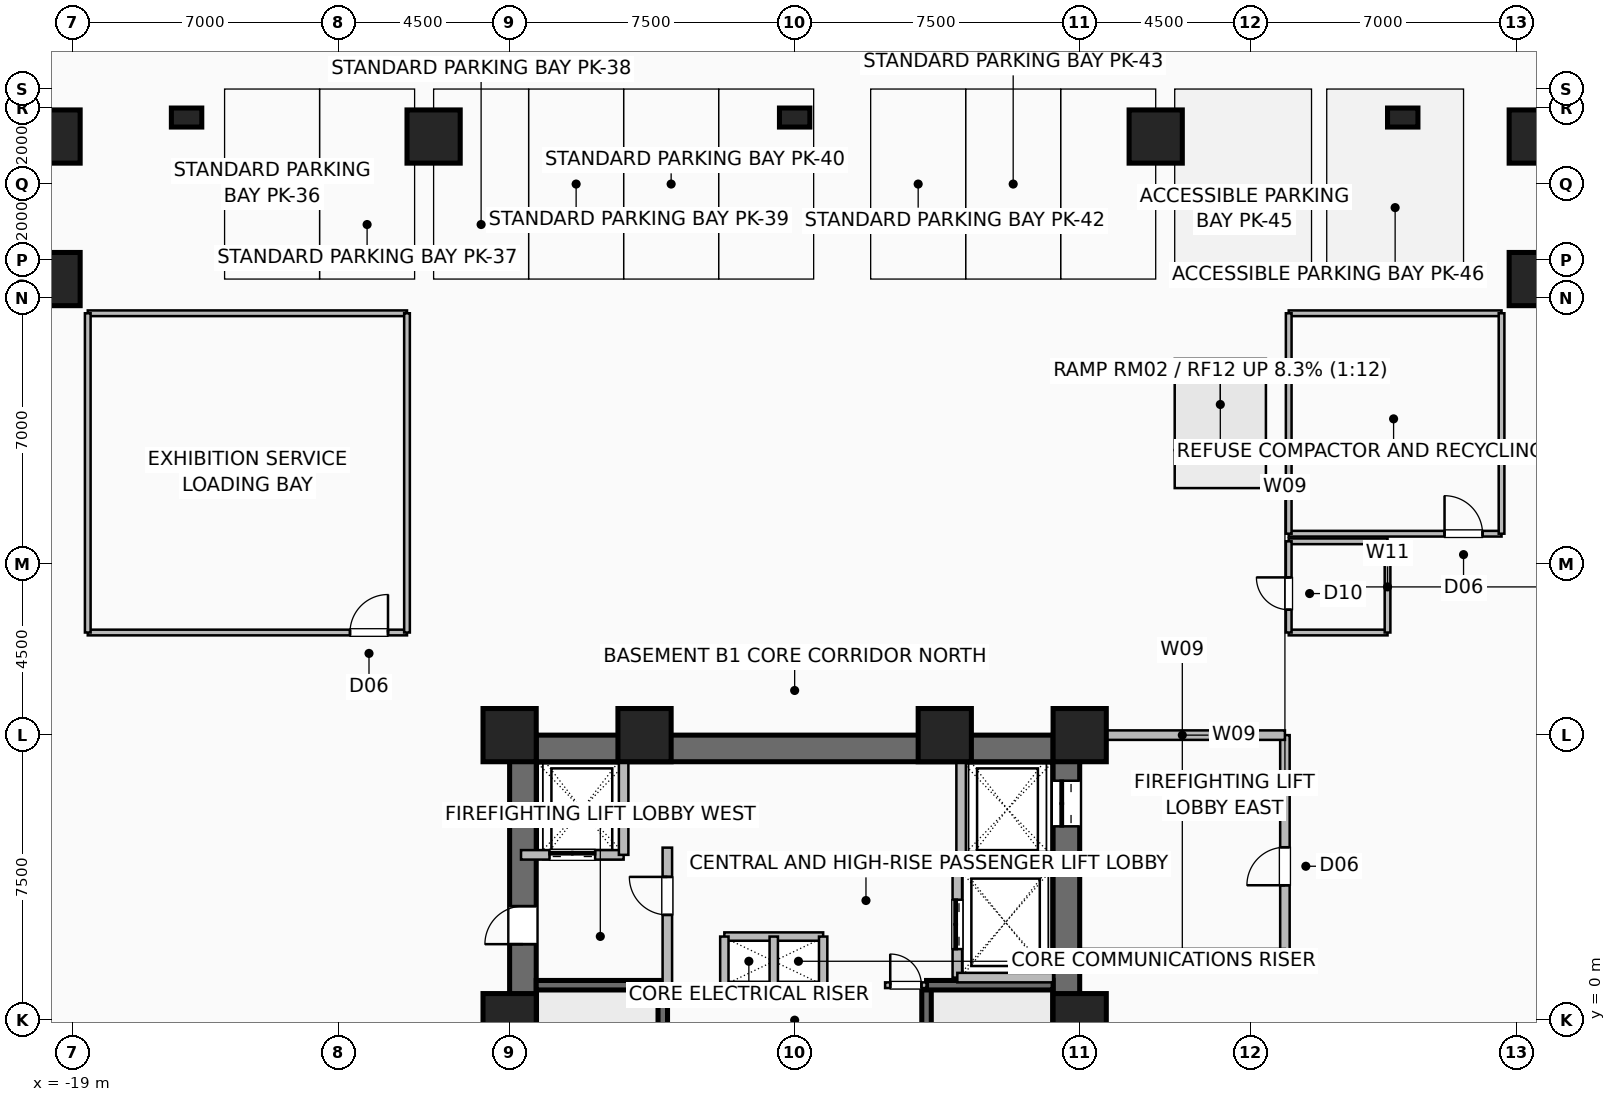
"""IFC4 building model, lengths in metres.
Left out: names, types, materials, properties, quantities, classifications, styles, units other than length and angle.
Written with IfcOpenShell. Run it as: python <this file> out.ifc"""

import sys

from ifc_helpers import new_model, si_unit, direction, frame, frame_2d, origin, origin_2d, place, context, subcontext, project, spatial, rectangle, hollow_rectangle, extrude, element, fill, save


model = new_model("IFC4")
c1 = context("Model", 3, precision=1e-05, world=origin(), true_north=direction((0.0, 1.0)))
c2 = subcontext(c1, "Body", "Model", "MODEL_VIEW")
j1 = project(units=[si_unit("LENGTHUNIT", "METRE"), si_unit("PLANEANGLEUNIT", "RADIAN")], contexts=[c1])
p1 = place(None, origin())
s1 = spatial("IfcSite", under=j1, at=p1, CompositionType="ELEMENT")
p2 = place(p1, origin())
s2 = spatial("IfcBuilding", under=s1, at=p2, CompositionType="ELEMENT")
p3 = place(p2, frame((0.0, 0.0, -5.4)))
s3 = spatial("IfcBuildingStorey", under=s2, at=p3, CompositionType="ELEMENT", Elevation=-5.4)
for number, where, z_axis, x_axis in (
    (1, (7.5, 0.0, 0.0), (0.0, 0.0, 1.0), (1.0, 0.0, 0.0)),
    (2, (7.5, 7.5, 0.0), (0.0, 0.0, 1.0), (1.0, 0.0, 0.0)),
    (3, (3.95, 7.5, 0.0), (0.0, 0.0, 1.0), (1.0, 0.0, 0.0)),
    (4, (-3.95, 7.5, 0.0), (0.0, 0.0, 1.0), (1.0, 0.0, 0.0)),
    (5, (-7.5, 7.5, 0.0), (0.0, 0.0, 1.0), (1.0, 0.0, 0.0)),
    (6, (-7.5, 0.0, 0.0), (0.0, 0.0, 1.0), (1.0, 0.0, 0.0)),
):
    element("IfcColumn", number, at=place(p3, frame(where, z_axis=z_axis, x_axis=x_axis)), inside=s3, PredefinedType="COLUMN", context=c2, shape_type="SweptSolid", body=[
        extrude(hollow_rectangle(XDim=1.4, YDim=1.4, WallThickness=0.06, at=origin_2d()), origin(), (0.0, 0.0, 1.0), 5.4),
    ])
for number, where, z_axis, x_axis in (
    (7, (-19.5, 23.25, 0.0), (0.0, 0.0, 1.0), (1.0, 0.0, 0.0)),
    (8, (-9.5, 23.25, 0.0), (0.0, 0.0, 1.0), (1.0, 0.0, 0.0)),
    (9, (9.5, 23.25, 0.0), (0.0, 0.0, 1.0), (1.0, 0.0, 0.0)),
    (10, (19.5, 23.25, 0.0), (0.0, 0.0, 1.0), (1.0, 0.0, 0.0)),
    (11, (19.5, 19.5, 0.0), (0.0, 0.0, 1.0), (1.0, 0.0, 0.0)),
    (12, (-19.5, 19.5, 0.0), (0.0, 0.0, 1.0), (1.0, 0.0, 0.0)),
):
    element("IfcColumn", number, at=place(p3, frame(where, z_axis=z_axis, x_axis=x_axis)), inside=s3, PredefinedType="COLUMN", context=c2, shape_type="SweptSolid", body=[
        extrude(rectangle(XDim=1.4, YDim=1.4, at=origin_2d()), origin(), (0.0, 0.0, 1.0), 5.4),
    ])
for number, where, z_axis, x_axis in (
    (13, (-16.0, 23.75, 0.0), (0.0, 0.0, 1.0), (1.0, 0.0, 0.0)),
    (14, (0.0, 23.75, 0.0), (0.0, 0.0, 1.0), (1.0, 0.0, 0.0)),
    (15, (16.0, 23.75, 0.0), (0.0, 0.0, 1.0), (1.0, 0.0, 0.0)),
):
    element("IfcColumn", number, at=place(p3, frame(where, z_axis=z_axis, x_axis=x_axis)), inside=s3, PredefinedType="PILASTER", context=c2, shape_type="SweptSolid", body=[
        extrude(rectangle(XDim=0.5, YDim=0.8, at=origin_2d()), origin(), (0.0, 0.0, 1.0), 5.4),
    ])
p4 = place(p3, frame((-7.5, 7.15, 0.0), z_axis=(0.0, 0.0, 1.0), x_axis=(1.0, 0.0, 0.0)))
e16 = element("IfcWall", 16, at=p4, inside=s3, PredefinedType="SHEAR", context=c2, shape_type="SweptSolid", body=[
    extrude(rectangle(XDim=15.0, YDim=0.7, at=frame_2d((7.5, 0.0))), origin(), (0.0, 0.0, 1.0), 5.05),
])
p5 = place(p3, frame((-7.15, -7.5, 0.0), z_axis=(0.0, 0.0, 1.0), x_axis=(0.0, 1.0, 0.0)))
e17 = element("IfcWall", 17, at=p5, inside=s3, PredefinedType="SHEAR", context=c2, shape_type="SweptSolid", body=[
    extrude(rectangle(XDim=15.0, YDim=0.7, at=frame_2d((7.5, 0.0))), origin(), (0.0, 0.0, 1.0), 5.05),
])
p6 = place(p5, frame((9.5, 0.0, 0.0)))
e18 = element("IfcOpeningElement", 18, at=p6, cuts=e17, PredefinedType="OPENING", context=c2, shape_type="SweptSolid", body=[
    extrude(rectangle(XDim=1.0, YDim=2.08, at=frame_2d((0.5, 1.04))), frame((0.0, 0.36, 0.0), z_axis=(0.0, -1.0, 0.0), x_axis=(1.0, 0.0, 0.0)), (0.0, 0.0, 1.0), 0.72),
])
p7 = place(p3, frame((7.15, -7.5, 0.0), z_axis=(0.0, 0.0, 1.0), x_axis=(0.0, 1.0, 0.0)))
e19 = element("IfcWall", 19, at=p7, inside=s3, PredefinedType="SHEAR", context=c2, shape_type="SweptSolid", body=[
    extrude(rectangle(XDim=15.0, YDim=0.7, at=frame_2d((7.5, 0.0))), origin(), (0.0, 0.0, 1.0), 5.05),
])
p8 = place(p7, frame((12.6, 0.0, 0.0)))
e20 = element("IfcOpeningElement", 20, at=p8, cuts=e19, PredefinedType="OPENING", context=c2, shape_type="SweptSolid", body=[
    extrude(rectangle(XDim=1.2, YDim=2.2, at=frame_2d((0.6, 1.1))), frame((0.0, 0.36, 0.0), z_axis=(0.0, -1.0, 0.0), x_axis=(1.0, 0.0, 0.0)), (0.0, 0.0, 1.0), 0.72),
])
p9 = place(p3, frame((-3.47, -6.8, 0.0), z_axis=(0.0, 0.0, 1.0), x_axis=(0.0, 1.0, 0.0)))
e21 = element("IfcWall", 21, at=p9, inside=s3, PredefinedType="SHEAR", context=c2, shape_type="SweptSolid", body=[
    extrude(rectangle(XDim=7.72, YDim=0.25, at=frame_2d((3.86, 0.0))), origin(), (0.0, 0.0, 1.0), 5.05),
])
p10 = place(p3, frame((-6.8, 0.92, 0.0), z_axis=(0.0, 0.0, 1.0), x_axis=(1.0, 0.0, 0.0)))
e22 = element("IfcWall", 22, at=p10, inside=s3, PredefinedType="SHEAR", context=c2, shape_type="SweptSolid", body=[
    extrude(rectangle(XDim=3.33, YDim=0.25, at=frame_2d((1.665, 0.0))), origin(), (0.0, 0.0, 1.0), 5.05),
])
p11 = place(p3, frame((3.47, -6.8, 0.0), z_axis=(0.0, 0.0, 1.0), x_axis=(0.0, 1.0, 0.0)))
e23 = element("IfcWall", 23, at=p11, inside=s3, PredefinedType="SHEAR", context=c2, shape_type="SweptSolid", body=[
    extrude(rectangle(XDim=7.72, YDim=0.25, at=frame_2d((3.86, 0.0))), origin(), (0.0, 0.0, 1.0), 5.05),
])
p12 = place(p3, frame((3.47, 0.92, 0.0), z_axis=(0.0, 0.0, 1.0), x_axis=(1.0, 0.0, 0.0)))
e24 = element("IfcWall", 24, at=p12, inside=s3, PredefinedType="SHEAR", context=c2, shape_type="SweptSolid", body=[
    extrude(rectangle(XDim=3.33, YDim=0.25, at=frame_2d((1.665, 0.0))), origin(), (0.0, 0.0, 1.0), 5.05),
])
for number, where, z_axis, x_axis in (
    (25, (-1.85, 2.2, 0.0), (0.0, 0.0, 1.0), (1.0, 0.0, 0.0)),
    (26, (-1.85, 0.9, 0.0), (0.0, 0.0, 1.0), (1.0, 0.0, 0.0)),
):
    element("IfcWall", number, at=place(p3, frame(where, z_axis=z_axis, x_axis=x_axis)), inside=s3, PredefinedType="PARTITIONING", context=c2, shape_type="SweptSolid", body=[
        extrude(rectangle(XDim=2.6, YDim=0.22, at=frame_2d((1.3, 0.0))), origin(), (0.0, 0.0, 1.0), 5.05),
    ])
for number, where, z_axis, x_axis in (
    (27, (-0.55, 0.9, 0.0), (0.0, 0.0, 1.0), (0.0, 1.0, 0.0)),
    (28, (0.75, 0.9, 0.0), (0.0, 0.0, 1.0), (0.0, 1.0, 0.0)),
    (29, (-1.85, 0.9, 0.0), (0.0, 0.0, 1.0), (0.0, 1.0, 0.0)),
):
    element("IfcWall", number, at=place(p3, frame(where, z_axis=z_axis, x_axis=x_axis)), inside=s3, PredefinedType="PARTITIONING", context=c2, shape_type="SweptSolid", body=[
        extrude(rectangle(XDim=1.3, YDim=0.22, at=frame_2d((0.65, 0.0))), origin(), (0.0, 0.0, 1.0), 5.05),
    ])
p13 = place(p3, frame((-7.2, 4.35, 0.0), z_axis=(0.0, 0.0, 1.0), x_axis=(1.0, 0.0, 0.0)))
e30 = element("IfcWall", 30, at=p13, inside=s3, PredefinedType="SHEAR", context=c2, shape_type="SweptSolid", body=[
    extrude(rectangle(XDim=2.7, YDim=0.25, at=frame_2d((1.35, 0.0))), origin(), (0.0, 0.0, 1.0), 5.05),
])
p14 = place(p13, frame((0.75, 0.0, 0.0)))
e31 = element("IfcOpeningElement", 31, at=p14, cuts=e30, PredefinedType="OPENING", context=c2, shape_type="SweptSolid", body=[
    extrude(rectangle(XDim=1.2, YDim=2.2, at=frame_2d((0.6, 1.1))), frame((0.0, 0.135, 0.0), z_axis=(0.0, -1.0, 0.0), x_axis=(1.0, 0.0, 0.0)), (0.0, 0.0, 1.0), 0.27),
])
p15 = place(p3, frame((-4.5, 4.35, 0.0), z_axis=(0.0, 0.0, 1.0), x_axis=(0.0, 1.0, 0.0)))
e32 = element("IfcWall", 32, at=p15, inside=s3, PredefinedType="SHEAR", context=c2, shape_type="SweptSolid", body=[
    extrude(rectangle(XDim=2.85, YDim=0.25, at=frame_2d((1.425, 0.0))), origin(), (0.0, 0.0, 1.0), 5.05),
])
p16 = place(p3, frame((4.38, 4.3, 0.0), z_axis=(0.0, 0.0, 1.0), x_axis=(1.0, 0.0, 0.0)))
e33 = element("IfcWall", 33, at=p16, inside=s3, PredefinedType="SHEAR", context=c2, shape_type="SweptSolid", body=[
    extrude(rectangle(XDim=2.42, YDim=0.25, at=frame_2d((1.21, 0.0))), origin(), (0.0, 0.0, 1.0), 5.05),
])
p17 = place(p3, frame((4.38, 4.3, 0.0), z_axis=(0.0, 0.0, 1.0), x_axis=(0.0, 1.0, 0.0)))
e34 = element("IfcWall", 34, at=p17, inside=s3, PredefinedType="SHEAR", context=c2, shape_type="SweptSolid", body=[
    extrude(rectangle(XDim=2.5, YDim=0.25, at=frame_2d((1.25, 0.0))), origin(), (0.0, 0.0, 1.0), 5.05),
])
p18 = place(p3, frame((4.28, 1.12, 0.0), z_axis=(0.0, 0.0, 1.0), x_axis=(0.0, 1.0, 0.0)))
e35 = element("IfcWall", 35, at=p18, inside=s3, PredefinedType="SHEAR", context=c2, shape_type="SweptSolid", body=[
    extrude(rectangle(XDim=2.9, YDim=0.25, at=frame_2d((1.45, 0.0))), origin(), (0.0, 0.0, 1.0), 5.05),
])
p19 = place(p18, frame((0.75, 0.0, 0.0)))
e36 = element("IfcOpeningElement", 36, at=p19, cuts=e35, PredefinedType="OPENING", context=c2, shape_type="SweptSolid", body=[
    extrude(rectangle(XDim=1.3, YDim=2.3, at=frame_2d((0.65, 1.15))), frame((0.0, 0.135, 0.0), z_axis=(0.0, -1.0, 0.0), x_axis=(1.0, 0.0, 0.0)), (0.0, 0.0, 1.0), 0.27),
])
for number, where, z_axis, x_axis in (
    (37, (4.28, 1.12, 0.0), (0.0, 0.0, 1.0), (1.0, 0.0, 0.0)),
    (38, (4.28, 4.02, 0.0), (0.0, 0.0, 1.0), (1.0, 0.0, 0.0)),
):
    element("IfcWall", number, at=place(p3, frame(where, z_axis=z_axis, x_axis=x_axis)), inside=s3, PredefinedType="SHEAR", context=c2, shape_type="SweptSolid", body=[
        extrude(rectangle(XDim=2.52, YDim=0.25, at=frame_2d((1.26, 0.0))), origin(), (0.0, 0.0, 1.0), 5.05),
    ])
p20 = place(p3, frame((-3.35, 0.92, 0.0), z_axis=(0.0, 0.0, 1.0), x_axis=(0.0, 1.0, 0.0)))
e39 = element("IfcWall", 39, at=p20, inside=s3, PredefinedType="SHEAR", context=c2, shape_type="SweptSolid", body=[
    extrude(rectangle(XDim=3.62, YDim=0.25, at=frame_2d((1.81, 0.0))), origin(), (0.0, 0.0, 1.0), 5.05),
])
p21 = place(p20, frame((1.85, 0.0, 0.0)))
e40 = element("IfcOpeningElement", 40, at=p21, cuts=e39, PredefinedType="OPENING", context=c2, shape_type="SweptSolid", body=[
    extrude(rectangle(XDim=1.0, YDim=2.08, at=frame_2d((0.5, 1.04))), frame((0.0, 0.135, 0.0), z_axis=(0.0, -1.0, 0.0), x_axis=(1.0, 0.0, 0.0)), (0.0, 0.0, 1.0), 0.27),
])
p22 = place(p3, frame((2.38, 0.92, 0.0), z_axis=(0.0, 0.0, 1.0), x_axis=(1.0, 0.0, 0.0)))
e41 = element("IfcWall", 41, at=p22, inside=s3, PredefinedType="PARTITIONING", context=c2, shape_type="SweptSolid", body=[
    extrude(rectangle(XDim=1.09, YDim=0.15, at=frame_2d((0.545, 0.0))), origin(), (0.0, 0.0, 1.0), 5.05),
])
p23 = place(p22, frame((0.135, 0.0, 0.0)))
e42 = element("IfcOpeningElement", 42, at=p23, cuts=e41, PredefinedType="OPENING", context=c2, shape_type="SweptSolid", body=[
    extrude(rectangle(XDim=0.82, YDim=2.05, at=frame_2d((0.41, 1.025))), frame((0.0, 0.085, 0.0), z_axis=(0.0, -1.0, 0.0), x_axis=(1.0, 0.0, 0.0)), (0.0, 0.0, 1.0), 0.17),
])
p24 = place(p3, frame((12.9, 1.75, 0.0), z_axis=(0.0, 0.0, 1.0), x_axis=(0.0, 1.0, 0.0)))
e43 = element("IfcWall", 43, at=p24, inside=s3, PredefinedType="SHEAR", context=c2, shape_type="SweptSolid", body=[
    extrude(rectangle(XDim=5.75, YDim=0.25, at=frame_2d((2.875, 0.0))), origin(), (0.0, 0.0, 1.0), 5.05),
])
p25 = place(p24, frame((1.8, 0.0, 0.0)))
e44 = element("IfcOpeningElement", 44, at=p25, cuts=e43, PredefinedType="OPENING", context=c2, shape_type="SweptSolid", body=[
    extrude(rectangle(XDim=1.0, YDim=2.08, at=frame_2d((0.5, 1.04))), frame((0.0, 0.135, 0.0), z_axis=(0.0, -1.0, 0.0), x_axis=(1.0, 0.0, 0.0)), (0.0, 0.0, 1.0), 0.27),
])
for number, where, z_axis, x_axis in (
    (45, (7.5, 1.75, 0.0), (0.0, 0.0, 1.0), (1.0, 0.0, 0.0)),
    (46, (7.5, 7.5, 0.0), (0.0, 0.0, 1.0), (1.0, 0.0, 0.0)),
):
    element("IfcWall", number, at=place(p3, frame(where, z_axis=z_axis, x_axis=x_axis)), inside=s3, PredefinedType="SHEAR", context=c2, shape_type="SweptSolid", body=[
        extrude(rectangle(XDim=5.4, YDim=0.25, at=frame_2d((2.7, 0.0))), origin(), (0.0, 0.0, 1.0), 5.05),
    ])
p26 = place(p3, frame((-18.6, 10.2, 0.0), z_axis=(0.0, 0.0, 1.0), x_axis=(1.0, 0.0, 0.0)))
e47 = element("IfcWall", 47, at=p26, inside=s3, PredefinedType="PARTITIONING", context=c2, shape_type="SweptSolid", body=[
    extrude(rectangle(XDim=8.4, YDim=0.15, at=frame_2d((4.2, 0.0))), origin(), (0.0, 0.0, 1.0), 5.05),
])
p27 = place(p26, frame((6.9, 0.0, 0.0)))
e48 = element("IfcOpeningElement", 48, at=p27, cuts=e47, PredefinedType="OPENING", context=c2, shape_type="SweptSolid", body=[
    extrude(rectangle(XDim=1.0, YDim=2.08, at=frame_2d((0.5, 1.04))), frame((0.0, 0.085, 0.0), z_axis=(0.0, -1.0, 0.0), x_axis=(1.0, 0.0, 0.0)), (0.0, 0.0, 1.0), 0.17),
])
for number, where, z_axis, x_axis in (
    (49, (-18.6, 18.6, 0.0), (0.0, 0.0, 1.0), (1.0, 0.0, 0.0)),
    (50, (-18.6, 10.2, 0.0), (0.0, 0.0, 1.0), (0.0, 1.0, 0.0)),
    (51, (-10.2, 10.2, 0.0), (0.0, 0.0, 1.0), (0.0, 1.0, 0.0)),
):
    element("IfcWall", number, at=place(p3, frame(where, z_axis=z_axis, x_axis=x_axis)), inside=s3, PredefinedType="PARTITIONING", context=c2, shape_type="SweptSolid", body=[
        extrude(rectangle(XDim=8.4, YDim=0.15, at=frame_2d((4.2, 0.0))), origin(), (0.0, 0.0, 1.0), 5.05),
    ])
p28 = place(p3, frame((13.0, 12.8, 0.0), z_axis=(0.0, 0.0, 1.0), x_axis=(1.0, 0.0, 0.0)))
e52 = element("IfcWall", 52, at=p28, inside=s3, PredefinedType="PARTITIONING", context=c2, shape_type="SweptSolid", body=[
    extrude(rectangle(XDim=5.6, YDim=0.15, at=frame_2d((2.8, 0.0))), origin(), (0.0, 0.0, 1.0), 5.05),
])
p29 = place(p28, frame((4.1, 0.0, 0.0)))
e53 = element("IfcOpeningElement", 53, at=p29, cuts=e52, PredefinedType="OPENING", context=c2, shape_type="SweptSolid", body=[
    extrude(rectangle(XDim=1.0, YDim=2.08, at=frame_2d((0.5, 1.04))), frame((0.0, 0.085, 0.0), z_axis=(0.0, -1.0, 0.0), x_axis=(1.0, 0.0, 0.0)), (0.0, 0.0, 1.0), 0.17),
])
p30 = place(p3, frame((13.0, 18.6, 0.0), z_axis=(0.0, 0.0, 1.0), x_axis=(1.0, 0.0, 0.0)))
e54 = element("IfcWall", 54, at=p30, inside=s3, PredefinedType="PARTITIONING", context=c2, shape_type="SweptSolid", body=[
    extrude(rectangle(XDim=5.6, YDim=0.15, at=frame_2d((2.8, 0.0))), origin(), (0.0, 0.0, 1.0), 5.05),
])
for number, where, z_axis, x_axis in (
    (55, (13.0, 12.8, 0.0), (0.0, 0.0, 1.0), (0.0, 1.0, 0.0)),
    (56, (18.6, 12.8, 0.0), (0.0, 0.0, 1.0), (0.0, 1.0, 0.0)),
):
    element("IfcWall", number, at=place(p3, frame(where, z_axis=z_axis, x_axis=x_axis)), inside=s3, PredefinedType="PARTITIONING", context=c2, shape_type="SweptSolid", body=[
        extrude(rectangle(XDim=5.8, YDim=0.15, at=frame_2d((2.9, 0.0))), origin(), (0.0, 0.0, 1.0), 5.05),
    ])
for number, where, z_axis, x_axis in (
    (57, (13.0, 10.2, 0.0), (0.0, 0.0, 1.0), (1.0, 0.0, 0.0)),
    (58, (13.0, 12.6, 0.0), (0.0, 0.0, 1.0), (1.0, 0.0, 0.0)),
):
    element("IfcWall", number, at=place(p3, frame(where, z_axis=z_axis, x_axis=x_axis)), inside=s3, PredefinedType="PARTITIONING", context=c2, shape_type="SweptSolid", body=[
        extrude(rectangle(XDim=2.6, YDim=0.15, at=frame_2d((1.3, 0.0))), origin(), (0.0, 0.0, 1.0), 5.05),
    ])
p31 = place(p3, frame((13.0, 10.2, 0.0), z_axis=(0.0, 0.0, 1.0), x_axis=(0.0, 1.0, 0.0)))
e59 = element("IfcWall", 59, at=p31, inside=s3, PredefinedType="PARTITIONING", context=c2, shape_type="SweptSolid", body=[
    extrude(rectangle(XDim=2.4, YDim=0.15, at=frame_2d((1.2, 0.0))), origin(), (0.0, 0.0, 1.0), 5.05),
])
p32 = place(p31, frame((0.6, 0.0, 0.0)))
e60 = element("IfcOpeningElement", 60, at=p32, cuts=e59, PredefinedType="OPENING", context=c2, shape_type="SweptSolid", body=[
    extrude(rectangle(XDim=0.85, YDim=2.05, at=frame_2d((0.425, 1.025))), frame((0.0, 0.085, 0.0), z_axis=(0.0, -1.0, 0.0), x_axis=(1.0, 0.0, 0.0)), (0.0, 0.0, 1.0), 0.17),
])
p33 = place(p3, frame((15.6, 10.2, 0.0), z_axis=(0.0, 0.0, 1.0), x_axis=(0.0, 1.0, 0.0)))
e61 = element("IfcWall", 61, at=p33, inside=s3, PredefinedType="PARTITIONING", context=c2, shape_type="SweptSolid", body=[
    extrude(rectangle(XDim=2.4, YDim=0.15, at=frame_2d((1.2, 0.0))), origin(), (0.0, 0.0, 1.0), 5.05),
])
p34 = place(p6, origin())
e62 = element("IfcDoor", 62, at=p34, inside=s3, OperationType="SINGLE_SWING_LEFT", PredefinedType="DOOR", context=c2, shape_type="SweptSolid", body=[
    extrude(rectangle(XDim=1.0, YDim=2.08, at=frame_2d((0.5, 1.04))), frame((0.0, 0.025, 0.0), z_axis=(0.0, -1.0, 0.0), x_axis=(1.0, 0.0, 0.0)), (0.0, 0.0, 1.0), 0.05),
])
fill(e18, e62)
p35 = place(p8, origin())
e63 = element("IfcDoor", 63, at=p35, inside=s3, OperationType="DOUBLE_DOOR_SLIDING", PredefinedType="DOOR", context=c2, shape_type="SweptSolid", body=[
    extrude(rectangle(XDim=1.2, YDim=2.2, at=frame_2d((0.6, 1.1))), frame((0.0, 0.025, 0.0), z_axis=(0.0, -1.0, 0.0), x_axis=(1.0, 0.0, 0.0)), (0.0, 0.0, 1.0), 0.05),
])
fill(e20, e63)
p36 = place(p14, origin())
e64 = element("IfcDoor", 64, at=p36, inside=s3, OperationType="DOUBLE_DOOR_SLIDING", PredefinedType="DOOR", context=c2, shape_type="SweptSolid", body=[
    extrude(rectangle(XDim=1.2, YDim=2.2, at=frame_2d((0.6, 1.1))), frame((0.0, 0.025, 0.0), z_axis=(0.0, -1.0, 0.0), x_axis=(1.0, 0.0, 0.0)), (0.0, 0.0, 1.0), 0.05),
])
fill(e31, e64)
p37 = place(p19, origin())
e65 = element("IfcDoor", 65, at=p37, inside=s3, OperationType="DOUBLE_DOOR_SLIDING", PredefinedType="DOOR", context=c2, shape_type="SweptSolid", body=[
    extrude(rectangle(XDim=1.3, YDim=2.3, at=frame_2d((0.65, 1.15))), frame((0.0, 0.025, 0.0), z_axis=(0.0, -1.0, 0.0), x_axis=(1.0, 0.0, 0.0)), (0.0, 0.0, 1.0), 0.05),
])
fill(e36, e65)
p38 = place(p21, origin())
e66 = element("IfcDoor", 66, at=p38, inside=s3, OperationType="SINGLE_SWING_RIGHT", PredefinedType="DOOR", context=c2, shape_type="SweptSolid", body=[
    extrude(rectangle(XDim=1.0, YDim=2.08, at=frame_2d((0.5, 1.04))), frame((0.0, 0.025, 0.0), z_axis=(0.0, -1.0, 0.0), x_axis=(1.0, 0.0, 0.0)), (0.0, 0.0, 1.0), 0.05),
])
fill(e40, e66)
p39 = place(p23, origin())
e67 = element("IfcDoor", 67, at=p39, inside=s3, OperationType="SINGLE_SWING_LEFT", PredefinedType="DOOR", context=c2, shape_type="SweptSolid", body=[
    extrude(rectangle(XDim=0.82, YDim=2.05, at=frame_2d((0.41, 1.025))), frame((0.0, 0.025, 0.0), z_axis=(0.0, -1.0, 0.0), x_axis=(1.0, 0.0, 0.0)), (0.0, 0.0, 1.0), 0.05),
])
fill(e42, e67)
p40 = place(p25, origin())
e68 = element("IfcDoor", 68, at=p40, inside=s3, OperationType="SINGLE_SWING_LEFT", PredefinedType="DOOR", context=c2, shape_type="SweptSolid", body=[
    extrude(rectangle(XDim=1.0, YDim=2.08, at=frame_2d((0.5, 1.04))), frame((0.0, 0.025, 0.0), z_axis=(0.0, -1.0, 0.0), x_axis=(1.0, 0.0, 0.0)), (0.0, 0.0, 1.0), 0.05),
])
fill(e44, e68)
p41 = place(p27, origin())
e69 = element("IfcDoor", 69, at=p41, inside=s3, OperationType="SINGLE_SWING_RIGHT", PredefinedType="DOOR", context=c2, shape_type="SweptSolid", body=[
    extrude(rectangle(XDim=1.0, YDim=2.08, at=frame_2d((0.5, 1.04))), frame((0.0, 0.025, 0.0), z_axis=(0.0, -1.0, 0.0), x_axis=(1.0, 0.0, 0.0)), (0.0, 0.0, 1.0), 0.05),
])
fill(e48, e69)
p42 = place(p29, origin())
e70 = element("IfcDoor", 70, at=p42, inside=s3, OperationType="SINGLE_SWING_LEFT", PredefinedType="DOOR", context=c2, shape_type="SweptSolid", body=[
    extrude(rectangle(XDim=1.0, YDim=2.08, at=frame_2d((0.5, 1.04))), frame((0.0, 0.025, 0.0), z_axis=(0.0, -1.0, 0.0), x_axis=(1.0, 0.0, 0.0)), (0.0, 0.0, 1.0), 0.05),
])
fill(e53, e70)
p43 = place(p32, origin())
e71 = element("IfcDoor", 71, at=p43, inside=s3, OperationType="SINGLE_SWING_RIGHT", PredefinedType="DOOR", context=c2, shape_type="SweptSolid", body=[
    extrude(rectangle(XDim=0.85, YDim=2.05, at=frame_2d((0.425, 1.025))), frame((0.0, 0.025, 0.0), z_axis=(0.0, -1.0, 0.0), x_axis=(1.0, 0.0, 0.0)), (0.0, 0.0, 1.0), 0.05),
])
fill(e60, e71)
save(model, sys.argv[1])
